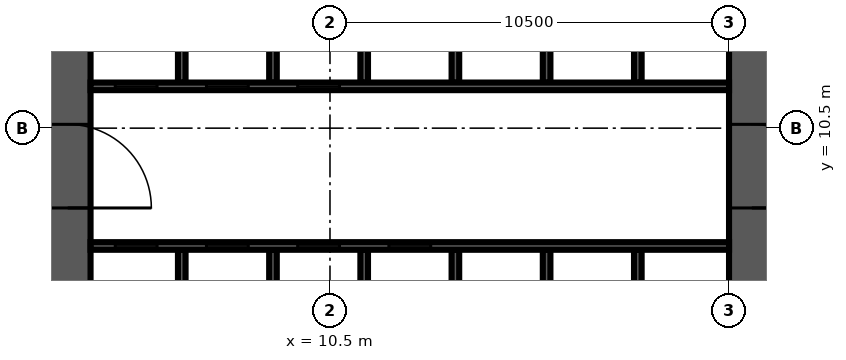
"""IFC4 building model, lengths in metres.
Left out: names, types, materials, properties, quantities, classifications, styles, units other than length and angle.
Written with IfcOpenShell. Run it as: python <this file> out.ifc"""

import sys

from ifc_helpers import new_model, si_unit, direction, frame, frame_2d, origin, place, context, subcontext, project, spatial, rectangle, extrude, source, transform, mapped, element, fill, save


model = new_model("IFC4")
c1 = context("Model", 3, precision=1e-05, world=origin(), true_north=direction((0.0, 1.0)))
c2 = subcontext(c1, "Body", "Model", "MODEL_VIEW")
j1 = project(units=[si_unit("LENGTHUNIT", "METRE"), si_unit("PLANEANGLEUNIT", "RADIAN")], contexts=[c1])
p1 = place(None, origin())
s1 = spatial("IfcSite", under=j1, at=p1, CompositionType="ELEMENT")
p2 = place(p1, origin())
s2 = spatial("IfcBuilding", under=s1, at=p2, CompositionType="ELEMENT")
p3 = place(p2, frame((0.0, 0.0, 61.5)))
s3 = spatial("IfcBuildingStorey", under=s2, at=p3, CompositionType="ELEMENT", Elevation=61.5)
m1 = source(origin(), c2, "Body", "SweptSolid", [
    extrude(rectangle(XDim=18.0, YDim=1.2, at=frame_2d((9.0, 0.0))), origin(), (0.0, 0.0, 1.0), 4.2),
])
p4 = place(p3, frame((3.6, 4.2, 0.0), z_axis=(0.0, 0.0, 1.0), x_axis=(0.0, 1.0, 0.0)))
e1 = element("IfcWall", 1, at=p4, inside=s3, PredefinedType="SHEAR", context=c2, shape_type="MappedRepresentation", body=[
    mapped(m1, transform((0.0, 0.0, 0.0), scale=1.0)),
])
m2 = source(origin(), c2, "Body", "SweptSolid", [
    extrude(rectangle(XDim=2.2, YDim=2.1, at=frame_2d((1.1, 1.05))), frame((0.0, 0.61, 0.0), z_axis=(0.0, -1.0, 0.0), x_axis=(1.0, 0.0, 0.0)), (0.0, 0.0, 1.0), 1.22),
])
p5 = place(p4, frame((4.2, 0.0, 0.0)))
e2 = element("IfcOpeningElement", 2, at=p5, cuts=e1, PredefinedType="OPENING", context=c2, shape_type="MappedRepresentation", body=[
    mapped(m2, transform((0.0, 0.0, 0.0), scale=1.0)),
])
m3 = source(origin(), c2, "Body", "SweptSolid", [
    extrude(rectangle(XDim=16.8, YDim=1.2, at=frame_2d((8.4, 0.0))), origin(), (0.0, 0.0, 1.0), 4.2),
])
p6 = place(p3, frame((21.6, 4.2, 0.0), z_axis=(0.0, 0.0, 1.0), x_axis=(0.0, 1.0, 0.0)))
e3 = element("IfcWall", 3, at=p6, inside=s3, PredefinedType="SHEAR", context=c2, shape_type="MappedRepresentation", body=[
    mapped(m3, transform((0.0, 0.0, 0.0), scale=1.0)),
])
p7 = place(p6, frame((4.2, 0.0, 0.0)))
e4 = element("IfcOpeningElement", 4, at=p7, cuts=e3, PredefinedType="OPENING", context=c2, shape_type="MappedRepresentation", body=[
    mapped(m2, transform((0.0, 0.0, 0.0), scale=1.0)),
])
m4 = source(origin(), c2, "Body", "SweptSolid", [
    extrude(rectangle(XDim=1.2, YDim=2.1, at=frame_2d((0.6, 1.05))), frame((0.0, 0.61, 0.0), z_axis=(0.0, -1.0, 0.0), x_axis=(1.0, 0.0, 0.0)), (0.0, 0.0, 1.0), 1.22),
])
p8 = place(p6, frame((14.7, 0.0, 0.0)))
e5 = element("IfcOpeningElement", 5, at=p8, cuts=e3, PredefinedType="OPENING", context=c2, shape_type="MappedRepresentation", body=[
    mapped(m4, transform((0.0, 0.0, 0.0), scale=1.0)),
])
m5 = source(origin(), c2, "Body", "SweptSolid", [
    extrude(rectangle(XDim=3.1, YDim=0.2, at=frame_2d((1.55, 0.0))), origin(), (0.0, 0.0, 1.0), 4.2),
])
for number, where, z_axis, x_axis in (
    (6, (6.6, 4.2, 0.0), (0.0, 0.0, 1.0), (0.0, 1.0, 0.0)),
    (7, (9.0, 4.2, 0.0), (0.0, 0.0, 1.0), (0.0, 1.0, 0.0)),
    (8, (11.4, 4.2, 0.0), (0.0, 0.0, 1.0), (0.0, 1.0, 0.0)),
    (9, (13.8, 4.2, 0.0), (0.0, 0.0, 1.0), (0.0, 1.0, 0.0)),
    (10, (16.2, 4.2, 0.0), (0.0, 0.0, 1.0), (0.0, 1.0, 0.0)),
    (11, (18.6, 4.2, 0.0), (0.0, 0.0, 1.0), (0.0, 1.0, 0.0)),
):
    element("IfcWall", number, at=place(p3, frame(where, z_axis=z_axis, x_axis=x_axis)), inside=s3, PredefinedType="SOLIDWALL", context=c2, shape_type="MappedRepresentation", body=[
        mapped(m5, transform((0.0, 0.0, 0.0), scale=1.0)),
    ])
m6 = source(origin(), c2, "Body", "SweptSolid", [
    extrude(rectangle(XDim=3.0, YDim=0.2, at=frame_2d((1.5, 0.0))), origin(), (0.0, 0.0, 1.0), 4.2),
])
for number, where, z_axis, x_axis in (
    (12, (6.6, 11.7, 0.0), (0.0, 0.0, 1.0), (0.0, 1.0, 0.0)),
    (13, (9.0, 11.7, 0.0), (0.0, 0.0, 1.0), (0.0, 1.0, 0.0)),
    (14, (11.4, 11.7, 0.0), (0.0, 0.0, 1.0), (0.0, 1.0, 0.0)),
    (15, (13.8, 11.7, 0.0), (0.0, 0.0, 1.0), (0.0, 1.0, 0.0)),
    (16, (16.2, 11.7, 0.0), (0.0, 0.0, 1.0), (0.0, 1.0, 0.0)),
    (17, (18.6, 11.7, 0.0), (0.0, 0.0, 1.0), (0.0, 1.0, 0.0)),
):
    element("IfcWall", number, at=place(p3, frame(where, z_axis=z_axis, x_axis=x_axis)), inside=s3, PredefinedType="SOLIDWALL", context=c2, shape_type="MappedRepresentation", body=[
        mapped(m6, transform((0.0, 0.0, 0.0), scale=1.0)),
    ])
m7 = source(origin(), c2, "Body", "SweptSolid", [
    extrude(rectangle(XDim=16.8, YDim=0.2, at=frame_2d((8.4, 0.0))), origin(), (0.0, 0.0, 1.0), 4.2),
])
p9 = place(p3, frame((4.2, 7.4, 0.0), z_axis=(0.0, 0.0, 1.0), x_axis=(1.0, 0.0, 0.0)))
e18 = element("IfcWall", 18, at=p9, inside=s3, PredefinedType="SOLIDWALL", context=c2, shape_type="MappedRepresentation", body=[
    mapped(m7, transform((0.0, 0.0, 0.0), scale=1.0)),
])
m8 = source(origin(), c2, "Body", "SweptSolid", [
    extrude(rectangle(XDim=1.1, YDim=2.1, at=frame_2d((0.55, 1.05))), frame((0.0, 0.11, 0.0), z_axis=(0.0, -1.0, 0.0), x_axis=(1.0, 0.0, 0.0)), (0.0, 0.0, 1.0), 0.22),
])
p10 = place(p9, frame((0.65, 0.0, 0.0)))
e19 = element("IfcOpeningElement", 19, at=p10, cuts=e18, PredefinedType="OPENING", context=c2, shape_type="MappedRepresentation", body=[
    mapped(m8, transform((0.0, 0.0, 0.0), scale=1.0)),
])
p11 = place(p9, frame((3.05, 0.0, 0.0)))
e20 = element("IfcOpeningElement", 20, at=p11, cuts=e18, PredefinedType="OPENING", context=c2, shape_type="MappedRepresentation", body=[
    mapped(m8, transform((0.0, 0.0, 0.0), scale=1.0)),
])
p12 = place(p9, frame((5.45, 0.0, 0.0)))
e21 = element("IfcOpeningElement", 21, at=p12, cuts=e18, PredefinedType="OPENING", context=c2, shape_type="MappedRepresentation", body=[
    mapped(m8, transform((0.0, 0.0, 0.0), scale=1.0)),
])
p13 = place(p9, frame((7.85, 0.0, 0.0)))
e22 = element("IfcOpeningElement", 22, at=p13, cuts=e18, PredefinedType="OPENING", context=c2, shape_type="MappedRepresentation", body=[
    mapped(m8, transform((0.0, 0.0, 0.0), scale=1.0)),
])
p14 = place(p3, frame((4.2, 11.6, 0.0), z_axis=(0.0, 0.0, 1.0), x_axis=(1.0, 0.0, 0.0)))
e23 = element("IfcWall", 23, at=p14, inside=s3, PredefinedType="SOLIDWALL", context=c2, shape_type="MappedRepresentation", body=[
    mapped(m7, transform((0.0, 0.0, 0.0), scale=1.0)),
])
p15 = place(p14, frame((0.65, 0.0, 0.0)))
e24 = element("IfcOpeningElement", 24, at=p15, cuts=e23, PredefinedType="OPENING", context=c2, shape_type="MappedRepresentation", body=[
    mapped(m8, transform((0.0, 0.0, 0.0), scale=1.0)),
])
p16 = place(p14, frame((3.05, 0.0, 0.0)))
e25 = element("IfcOpeningElement", 25, at=p16, cuts=e23, PredefinedType="OPENING", context=c2, shape_type="MappedRepresentation", body=[
    mapped(m8, transform((0.0, 0.0, 0.0), scale=1.0)),
])
p17 = place(p14, frame((5.45, 0.0, 0.0)))
e26 = element("IfcOpeningElement", 26, at=p17, cuts=e23, PredefinedType="OPENING", context=c2, shape_type="MappedRepresentation", body=[
    mapped(m8, transform((0.0, 0.0, 0.0), scale=1.0)),
])
m9 = source(origin(), c2, "Body", "SweptSolid", [
    extrude(rectangle(XDim=1.1, YDim=2.1, at=frame_2d((0.55, 1.05))), frame((0.0, 0.025, 0.0), z_axis=(0.0, -1.0, 0.0), x_axis=(1.0, 0.0, 0.0)), (0.0, 0.0, 1.0), 0.05),
])
p18 = place(p10, origin())
e27 = element("IfcDoor", 27, at=p18, inside=s3, OperationType="SLIDING_TO_LEFT", PredefinedType="DOOR", context=c2, shape_type="MappedRepresentation", body=[
    mapped(m9, transform((0.0, 0.0, 0.0), scale=1.0)),
])
fill(e19, e27)
p19 = place(p11, origin())
e28 = element("IfcDoor", 28, at=p19, inside=s3, OperationType="SLIDING_TO_LEFT", PredefinedType="DOOR", context=c2, shape_type="MappedRepresentation", body=[
    mapped(m9, transform((0.0, 0.0, 0.0), scale=1.0)),
])
fill(e20, e28)
p20 = place(p12, origin())
e29 = element("IfcDoor", 29, at=p20, inside=s3, OperationType="SLIDING_TO_LEFT", PredefinedType="DOOR", context=c2, shape_type="MappedRepresentation", body=[
    mapped(m9, transform((0.0, 0.0, 0.0), scale=1.0)),
])
fill(e21, e29)
p21 = place(p13, origin())
e30 = element("IfcDoor", 30, at=p21, inside=s3, OperationType="SLIDING_TO_LEFT", PredefinedType="DOOR", context=c2, shape_type="MappedRepresentation", body=[
    mapped(m9, transform((0.0, 0.0, 0.0), scale=1.0)),
])
fill(e22, e30)
p22 = place(p15, origin())
e31 = element("IfcDoor", 31, at=p22, inside=s3, OperationType="SLIDING_TO_LEFT", PredefinedType="DOOR", context=c2, shape_type="MappedRepresentation", body=[
    mapped(m9, transform((0.0, 0.0, 0.0), scale=1.0)),
])
fill(e24, e31)
p23 = place(p16, origin())
e32 = element("IfcDoor", 32, at=p23, inside=s3, OperationType="SLIDING_TO_LEFT", PredefinedType="DOOR", context=c2, shape_type="MappedRepresentation", body=[
    mapped(m9, transform((0.0, 0.0, 0.0), scale=1.0)),
])
fill(e25, e32)
p24 = place(p17, origin())
e33 = element("IfcDoor", 33, at=p24, inside=s3, OperationType="SLIDING_TO_LEFT", PredefinedType="DOOR", context=c2, shape_type="MappedRepresentation", body=[
    mapped(m9, transform((0.0, 0.0, 0.0), scale=1.0)),
])
fill(e26, e33)
m10 = source(origin(), c2, "Body", "SweptSolid", [
    extrude(rectangle(XDim=2.2, YDim=2.1, at=frame_2d((1.1, 1.05))), frame((0.0, 0.025, 0.0), z_axis=(0.0, -1.0, 0.0), x_axis=(1.0, 0.0, 0.0)), (0.0, 0.0, 1.0), 0.05),
])
p25 = place(p7, origin())
e34 = element("IfcDoor", 34, at=p25, inside=s3, OperationType="DOUBLE_DOOR_SINGLE_SWING", PredefinedType="DOOR", context=c2, shape_type="MappedRepresentation", body=[
    mapped(m10, transform((0.0, 0.0, 0.0), scale=1.0)),
])
fill(e4, e34)
p26 = place(p5, origin())
e35 = element("IfcDoor", 35, at=p26, inside=s3, OperationType="DOUBLE_DOOR_SINGLE_SWING", PredefinedType="DOOR", context=c2, shape_type="MappedRepresentation", body=[
    mapped(m10, transform((0.0, 0.0, 0.0), scale=1.0)),
])
fill(e2, e35)
save(model, sys.argv[1])
